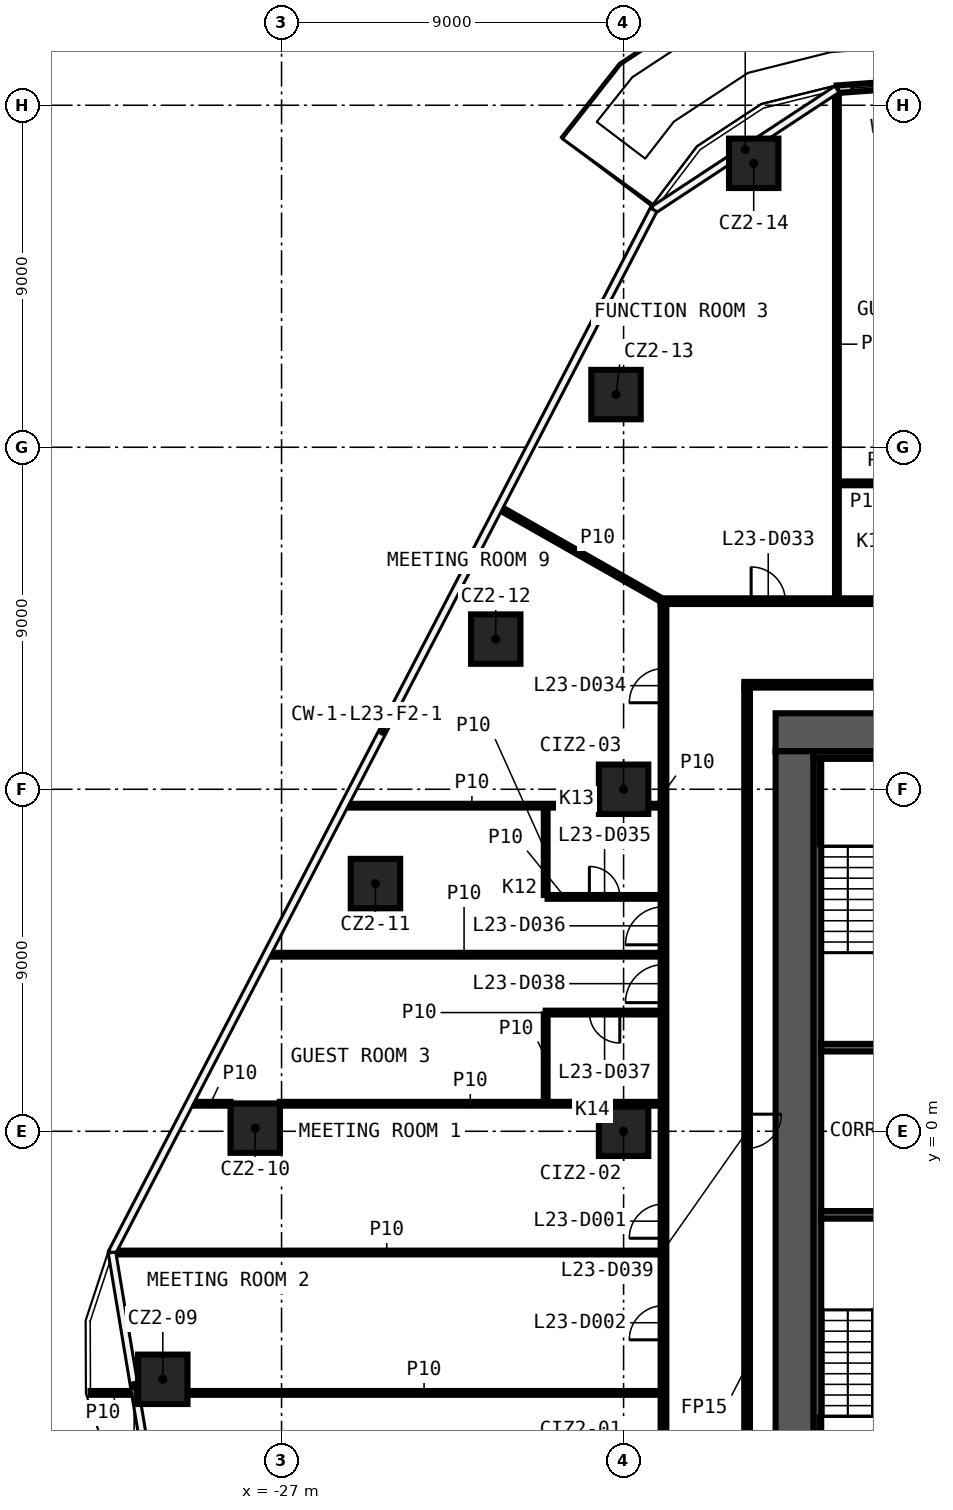
"""IFC4 building model, lengths in metres.
Left out: names, types, materials, properties, quantities, classifications, styles, units other than length and angle.
Written with IfcOpenShell. Run it as: python <this file> out.ifc"""

import sys

from ifc_helpers import new_model, si_unit, direction, frame, frame_2d, origin, origin_2d, place, context, subcontext, project, spatial, rectangle, extrude, element, fill, save


model = new_model("IFC4")
c1 = context("Model", 3, precision=1e-05, world=origin(), true_north=direction((0.0, 1.0)))
c2 = subcontext(c1, "Body", "Model", "MODEL_VIEW")
j1 = project(units=[si_unit("LENGTHUNIT", "METRE"), si_unit("PLANEANGLEUNIT", "RADIAN")], contexts=[c1])
p1 = place(None, origin())
s1 = spatial("IfcSite", under=j1, at=p1, CompositionType="ELEMENT")
p2 = place(p1, origin())
s2 = spatial("IfcBuilding", under=s1, at=p2, CompositionType="ELEMENT")
p3 = place(p2, frame((0.0, 0.0, 110.0)))
s3 = spatial("IfcBuildingStorey", under=s2, at=p3, CompositionType="ELEMENT", Elevation=110.0)
for number, where, z_axis, x_axis in (
    (1, (-30.125, -6.527, 0.0), (0.0, 0.0, 1.0), (1.0, 0.0, 0.0)),
    (2, (-27.693, 0.083, 0.0), (0.0, 0.0, 1.0), (1.0, 0.0, 0.0)),
    (3, (-24.529, 6.518, 0.0), (0.0, 0.0, 1.0), (1.0, 0.0, 0.0)),
    (4, (-21.364, 12.952, 0.0), (0.0, 0.0, 1.0), (1.0, 0.0, 0.0)),
    (5, (-18.199, 19.386, 0.0), (0.0, 0.0, 1.0), (1.0, 0.0, 0.0)),
    (6, (-14.576, 25.472, 0.0), (0.0, 0.0, 1.0), (1.0, 0.0, 0.0)),
    (7, (-18.0, 0.0, 0.0), (0.0, 0.0, 1.0), (1.0, 0.0, 0.0)),
    (8, (-18.0, 9.0, 0.0), (0.0, 0.0, 1.0), (1.0, 0.0, 0.0)),
):
    element("IfcColumn", number, at=place(p3, frame(where, z_axis=z_axis, x_axis=x_axis)), inside=s3, PredefinedType="COLUMN", context=c2, shape_type="SweptSolid", body=[
        extrude(rectangle(XDim=1.3, YDim=1.3, at=origin_2d()), origin(), (0.0, 0.0, 1.0), 3.3),
    ])
p4 = place(p3, frame((-32.027, -6.885, 0.0), z_axis=(0.0, 0.0, 1.0), x_axis=(1.0, 0.0, 0.0)))
e9 = element("IfcWall", 9, at=p4, inside=s3, PredefinedType="PARTITIONING", context=c2, shape_type="SweptSolid", body=[
    extrude(rectangle(XDim=1.252, YDim=0.1, at=frame_2d((0.626, 0.0))), origin(), (0.0, 0.0, 1.0), 3.3),
])
p5 = place(p3, frame((-29.475, -6.885, 0.0), z_axis=(0.0, 0.0, 1.0), x_axis=(1.0, 0.0, 0.0)))
e10 = element("IfcWall", 10, at=p5, inside=s3, PredefinedType="PARTITIONING", context=c2, shape_type="SweptSolid", body=[
    extrude(rectangle(XDim=12.45, YDim=0.1, at=frame_2d((6.225, 0.0))), origin(), (0.0, 0.0, 1.0), 3.3),
])
p6 = place(p3, frame((-31.439, -3.191, 0.0), z_axis=(0.0, 0.0, 1.0), x_axis=(1.0, 0.0, 0.0)))
e11 = element("IfcWall", 11, at=p6, inside=s3, PredefinedType="PARTITIONING", context=c2, shape_type="SweptSolid", body=[
    extrude(rectangle(XDim=14.414, YDim=0.1, at=frame_2d((7.207, 0.0))), origin(), (0.0, 0.0, 1.0), 3.3),
])
p7 = place(p3, frame((-29.406, 0.724, 0.0), z_axis=(0.0, 0.0, 1.0), x_axis=(1.0, 0.0, 0.0)))
e12 = element("IfcWall", 12, at=p7, inside=s3, PredefinedType="PARTITIONING", context=c2, shape_type="SweptSolid", body=[
    extrude(rectangle(XDim=1.063, YDim=0.1, at=frame_2d((0.531, 0.0))), origin(), (0.0, 0.0, 1.0), 3.3),
])
p8 = place(p3, frame((-27.043, 0.724, 0.0), z_axis=(0.0, 0.0, 1.0), x_axis=(1.0, 0.0, 0.0)))
e13 = element("IfcWall", 13, at=p8, inside=s3, PredefinedType="PARTITIONING", context=c2, shape_type="SweptSolid", body=[
    extrude(rectangle(XDim=10.018, YDim=0.1, at=frame_2d((5.009, 0.0))), origin(), (0.0, 0.0, 1.0), 3.3),
])
p9 = place(p3, frame((-17.025, 3.124, 0.0), z_axis=(0.0, 0.0, 1.0), x_axis=(-1.0, 0.0, 0.0)))
e14 = element("IfcWall", 14, at=p9, inside=s3, PredefinedType="PARTITIONING", context=c2, shape_type="SweptSolid", body=[
    extrude(rectangle(XDim=3.025, YDim=0.1, at=frame_2d((1.513, 0.0))), origin(), (0.0, 0.0, 1.0), 3.3),
])
p10 = place(p9, frame((1.075, 0.0, 0.0)))
e15 = element("IfcOpeningElement", 15, at=p10, cuts=e14, PredefinedType="OPENING", context=c2, shape_type="SweptSolid", body=[
    extrude(rectangle(XDim=0.8, YDim=2.1, at=frame_2d((0.4, 1.05))), frame((0.0, 0.06, 0.0), z_axis=(0.0, -1.0, 0.0), x_axis=(1.0, 0.0, 0.0)), (0.0, 0.0, 1.0), 0.12),
])
p11 = place(p3, frame((-27.369, 4.646, 0.0), z_axis=(0.0, 0.0, 1.0), x_axis=(1.0, 0.0, 0.0)))
e16 = element("IfcWall", 16, at=p11, inside=s3, PredefinedType="PARTITIONING", context=c2, shape_type="SweptSolid", body=[
    extrude(rectangle(XDim=10.344, YDim=0.1, at=frame_2d((5.172, 0.0))), origin(), (0.0, 0.0, 1.0), 3.3),
])
p12 = place(p3, frame((-20.0, 6.168, 0.0), z_axis=(0.0, 0.0, 1.0), x_axis=(1.0, 0.0, 0.0)))
e17 = element("IfcWall", 17, at=p12, inside=s3, PredefinedType="PARTITIONING", context=c2, shape_type="SweptSolid", body=[
    extrude(rectangle(XDim=2.975, YDim=0.1, at=frame_2d((1.488, 0.0))), origin(), (0.0, 0.0, 1.0), 3.3),
])
p13 = place(p12, frame((1.1, 0.0, 0.0)))
e18 = element("IfcOpeningElement", 18, at=p13, cuts=e17, PredefinedType="OPENING", context=c2, shape_type="SweptSolid", body=[
    extrude(rectangle(XDim=0.8, YDim=2.1, at=frame_2d((0.4, 1.05))), frame((0.0, 0.06, 0.0), z_axis=(0.0, -1.0, 0.0), x_axis=(1.0, 0.0, 0.0)), (0.0, 0.0, 1.0), 0.12),
])
p14 = place(p3, frame((-25.333, 8.568, 0.0), z_axis=(0.0, 0.0, 1.0), x_axis=(1.0, 0.0, 0.0)))
e19 = element("IfcWall", 19, at=p14, inside=s3, PredefinedType="PARTITIONING", context=c2, shape_type="SweptSolid", body=[
    extrude(rectangle(XDim=6.683, YDim=0.1, at=frame_2d((3.341, 0.0))), origin(), (0.0, 0.0, 1.0), 3.3),
])
p15 = place(p3, frame((-17.35, 8.568, 0.0), z_axis=(0.0, 0.0, 1.0), x_axis=(1.0, 0.0, 0.0)))
e20 = element("IfcWall", 20, at=p15, inside=s3, PredefinedType="PARTITIONING", context=c2, shape_type="SweptSolid", body=[
    extrude(rectangle(XDim=0.325, YDim=0.1, at=frame_2d((0.163, 0.0))), origin(), (0.0, 0.0, 1.0), 3.3),
])
p16 = place(p3, frame((-14.825, 11.75, 0.0), z_axis=(0.0, 0.0, 1.0), x_axis=(1.0, 0.0, 0.0)))
e21 = element("IfcWall", 21, at=p16, inside=s3, PredefinedType="PARTITIONING", context=c2, shape_type="SweptSolid", body=[
    extrude(rectangle(XDim=16.625, YDim=0.15, at=frame_2d((8.312, 0.0))), origin(), (0.0, 0.0, 1.0), 3.3),
])
p17 = place(p3, frame((-17.025, 13.95, 0.0), z_axis=(0.0, 0.0, 1.0), x_axis=(1.0, 0.0, 0.0)))
e22 = element("IfcWall", 22, at=p17, inside=s3, PredefinedType="PARTITIONING", context=c2, shape_type="SweptSolid", body=[
    extrude(rectangle(XDim=34.05, YDim=0.15, at=frame_2d((17.025, 0.0))), origin(), (0.0, 0.0, 1.0), 3.3),
])
p18 = place(p17, frame((29.735, 0.0, 0.0)))
e23 = element("IfcOpeningElement", 23, at=p18, cuts=e22, PredefinedType="OPENING", context=c2, shape_type="SweptSolid", body=[
    extrude(rectangle(XDim=1.0, YDim=2.1, at=frame_2d((0.5, 1.05))), frame((0.0, 0.085, 0.0), z_axis=(0.0, -1.0, 0.0), x_axis=(1.0, 0.0, 0.0)), (0.0, 0.0, 1.0), 0.17),
])
p19 = place(p17, frame((25.513, 0.0, 0.0)))
e24 = element("IfcOpeningElement", 24, at=p19, cuts=e22, PredefinedType="OPENING", context=c2, shape_type="SweptSolid", body=[
    extrude(rectangle(XDim=1.0, YDim=2.1, at=frame_2d((0.5, 1.05))), frame((0.0, 0.085, 0.0), z_axis=(0.0, -1.0, 0.0), x_axis=(1.0, 0.0, 0.0)), (0.0, 0.0, 1.0), 0.17),
])
p20 = place(p17, frame((18.631, 0.0, 0.0)))
e25 = element("IfcOpeningElement", 25, at=p20, cuts=e22, PredefinedType="OPENING", context=c2, shape_type="SweptSolid", body=[
    extrude(rectangle(XDim=1.0, YDim=2.1, at=frame_2d((0.5, 1.05))), frame((0.0, 0.085, 0.0), z_axis=(0.0, -1.0, 0.0), x_axis=(1.0, 0.0, 0.0)), (0.0, 0.0, 1.0), 0.17),
])
p21 = place(p17, frame((16.545, 0.0, 0.0)))
e26 = element("IfcOpeningElement", 26, at=p21, cuts=e22, PredefinedType="OPENING", context=c2, shape_type="SweptSolid", body=[
    extrude(rectangle(XDim=1.0, YDim=2.1, at=frame_2d((0.5, 1.05))), frame((0.0, 0.085, 0.0), z_axis=(0.0, -1.0, 0.0), x_axis=(1.0, 0.0, 0.0)), (0.0, 0.0, 1.0), 0.17),
])
p22 = place(p17, frame((9.659, 0.0, 0.0)))
e27 = element("IfcOpeningElement", 27, at=p22, cuts=e22, PredefinedType="OPENING", context=c2, shape_type="SweptSolid", body=[
    extrude(rectangle(XDim=1.0, YDim=2.1, at=frame_2d((0.5, 1.05))), frame((0.0, 0.085, 0.0), z_axis=(0.0, -1.0, 0.0), x_axis=(1.0, 0.0, 0.0)), (0.0, 0.0, 1.0), 0.17),
])
p23 = place(p17, frame((7.577, 0.0, 0.0)))
e28 = element("IfcOpeningElement", 28, at=p23, cuts=e22, PredefinedType="OPENING", context=c2, shape_type="SweptSolid", body=[
    extrude(rectangle(XDim=1.0, YDim=2.1, at=frame_2d((0.5, 1.05))), frame((0.0, 0.085, 0.0), z_axis=(0.0, -1.0, 0.0), x_axis=(1.0, 0.0, 0.0)), (0.0, 0.0, 1.0), 0.17),
])
p24 = place(p17, frame((2.381, 0.0, 0.0)))
e29 = element("IfcOpeningElement", 29, at=p24, cuts=e22, PredefinedType="OPENING", context=c2, shape_type="SweptSolid", body=[
    extrude(rectangle(XDim=0.9, YDim=2.1, at=frame_2d((0.45, 1.05))), frame((0.0, 0.085, 0.0), z_axis=(0.0, -1.0, 0.0), x_axis=(1.0, 0.0, 0.0)), (0.0, 0.0, 1.0), 0.17),
])
p25 = place(p3, frame((-12.337, 17.05, 0.0), z_axis=(0.0, 0.0, 1.0), x_axis=(1.0, 0.0, 0.0)))
e30 = element("IfcWall", 30, at=p25, inside=s3, PredefinedType="PARTITIONING", context=c2, shape_type="SweptSolid", body=[
    extrude(rectangle(XDim=2.4, YDim=0.1, at=frame_2d((1.2, 0.0))), origin(), (0.0, 0.0, 1.0), 3.3),
])
p26 = place(p3, frame((-12.387, 14.025, 0.0), z_axis=(0.0, 0.0, 1.0), x_axis=(0.0, 1.0, 0.0)))
e31 = element("IfcWall", 31, at=p26, inside=s3, PredefinedType="PARTITIONING", context=c2, shape_type="SweptSolid", body=[
    extrude(rectangle(XDim=13.376, YDim=0.1, at=frame_2d((6.688, 0.0))), origin(), (0.0, 0.0, 1.0), 3.3),
])
p27 = place(p3, frame((-14.75, 11.675, 0.0), z_axis=(0.0, 0.0, 1.0), x_axis=(0.0, -1.0, 0.0)))
e32 = element("IfcWall", 32, at=p27, inside=s3, PredefinedType="PARTITIONING", context=c2, shape_type="SweptSolid", body=[
    extrude(rectangle(XDim=23.35, YDim=0.15, at=frame_2d((11.675, 0.0))), origin(), (0.0, 0.0, 1.0), 3.3),
])
p28 = place(p27, frame((11.225, 0.0, 0.0)))
e33 = element("IfcOpeningElement", 33, at=p28, cuts=e32, PredefinedType="OPENING", context=c2, shape_type="SweptSolid", body=[
    extrude(rectangle(XDim=0.9, YDim=2.1, at=frame_2d((0.45, 1.05))), frame((0.0, 0.085, 0.0), z_axis=(0.0, -1.0, 0.0), x_axis=(1.0, 0.0, 0.0)), (0.0, 0.0, 1.0), 0.17),
])
p29 = place(p3, frame((-16.95, -13.875, 0.0), z_axis=(0.0, 0.0, 1.0), x_axis=(0.0, 1.0, 0.0)))
e34 = element("IfcWall", 34, at=p29, inside=s3, PredefinedType="PARTITIONING", context=c2, shape_type="SweptSolid", body=[
    extrude(rectangle(XDim=27.75, YDim=0.15, at=frame_2d((13.875, 0.0))), origin(), (0.0, 0.0, 1.0), 3.3),
])
p30 = place(p29, frame((11.06, 0.0, 0.0)))
e35 = element("IfcOpeningElement", 35, at=p30, cuts=e34, PredefinedType="OPENING", context=c2, shape_type="SweptSolid", body=[
    extrude(rectangle(XDim=0.9, YDim=2.1, at=frame_2d((0.45, 1.05))), frame((0.0, 0.085, 0.0), z_axis=(0.0, -1.0, 0.0), x_axis=(1.0, 0.0, 0.0)), (0.0, 0.0, 1.0), 0.17),
])
p31 = place(p29, frame((8.387, 0.0, 0.0)))
e36 = element("IfcOpeningElement", 36, at=p31, cuts=e34, PredefinedType="OPENING", context=c2, shape_type="SweptSolid", body=[
    extrude(rectangle(XDim=0.9, YDim=2.1, at=frame_2d((0.45, 1.05))), frame((0.0, 0.085, 0.0), z_axis=(0.0, -1.0, 0.0), x_axis=(1.0, 0.0, 0.0)), (0.0, 0.0, 1.0), 0.17),
])
p32 = place(p29, frame((1.666, 0.0, 0.0)))
e37 = element("IfcOpeningElement", 37, at=p32, cuts=e34, PredefinedType="OPENING", context=c2, shape_type="SweptSolid", body=[
    extrude(rectangle(XDim=0.9, YDim=2.1, at=frame_2d((0.45, 1.05))), frame((0.0, 0.085, 0.0), z_axis=(0.0, -1.0, 0.0), x_axis=(1.0, 0.0, 0.0)), (0.0, 0.0, 1.0), 0.17),
])
p33 = place(p29, frame((25.152, 0.0, 0.0)))
e38 = element("IfcOpeningElement", 38, at=p33, cuts=e34, PredefinedType="OPENING", context=c2, shape_type="SweptSolid", body=[
    extrude(rectangle(XDim=0.9, YDim=2.1, at=frame_2d((0.45, 1.05))), frame((0.0, 0.085, 0.0), z_axis=(0.0, -1.0, 0.0), x_axis=(1.0, 0.0, 0.0)), (0.0, 0.0, 1.0), 0.17),
])
p34 = place(p29, frame((18.782, 0.0, 0.0)))
e39 = element("IfcOpeningElement", 39, at=p34, cuts=e34, PredefinedType="OPENING", context=c2, shape_type="SweptSolid", body=[
    extrude(rectangle(XDim=1.0, YDim=2.1, at=frame_2d((0.5, 1.05))), frame((0.0, 0.085, 0.0), z_axis=(0.0, -1.0, 0.0), x_axis=(1.0, 0.0, 0.0)), (0.0, 0.0, 1.0), 0.17),
])
p35 = place(p29, frame((17.26, 0.0, 0.0)))
e40 = element("IfcOpeningElement", 40, at=p35, cuts=e34, PredefinedType="OPENING", context=c2, shape_type="SweptSolid", body=[
    extrude(rectangle(XDim=1.0, YDim=2.1, at=frame_2d((0.5, 1.05))), frame((0.0, 0.085, 0.0), z_axis=(0.0, -1.0, 0.0), x_axis=(1.0, 0.0, 0.0)), (0.0, 0.0, 1.0), 0.17),
])
p36 = place(p3, frame((-20.05, 0.774, 0.0), z_axis=(0.0, 0.0, 1.0), x_axis=(0.0, 1.0, 0.0)))
e41 = element("IfcWall", 41, at=p36, inside=s3, PredefinedType="PARTITIONING", context=c2, shape_type="SweptSolid", body=[
    extrude(rectangle(XDim=2.3, YDim=0.1, at=frame_2d((1.15, 0.0))), origin(), (0.0, 0.0, 1.0), 3.3),
])
p37 = place(p3, frame((-20.05, 6.218, 0.0), z_axis=(0.0, 0.0, 1.0), x_axis=(0.0, 1.0, 0.0)))
e42 = element("IfcWall", 42, at=p37, inside=s3, PredefinedType="PARTITIONING", context=c2, shape_type="SweptSolid", body=[
    extrude(rectangle(XDim=2.3, YDim=0.1, at=frame_2d((1.15, 0.0))), origin(), (0.0, 0.0, 1.0), 3.3),
])
p38 = place(p3, frame((-21.264, 16.401, 0.0), z_axis=(0.0, 0.0, 1.0), x_axis=(0.869409483432, -0.494092248592, 0.0)))
e43 = element("IfcWall", 43, at=p38, inside=s3, PredefinedType="PARTITIONING", context=c2, shape_type="SweptSolid", body=[
    extrude(rectangle(XDim=4.962, YDim=0.1, at=frame_2d((2.481, 0.0))), origin(), (0.0, 0.0, 1.0), 3.3),
])
p39 = place(p3, frame((-7.909, 27.743, 0.0), z_axis=(0.0, 0.0, 1.0), x_axis=(-0.997423796537, -0.071734023317, 0.0)))
e44 = element("IfcWall", 44, at=p39, inside=s3, PredefinedType="SOLIDWALL", context=c2, shape_type="SweptSolid", body=[
    extrude(rectangle(XDim=4.489, YDim=0.2, at=frame_2d((2.245, 0.0))), origin(), (0.0, 0.0, 1.0), 3.3),
])
p40 = place(p39, frame((2.5, 0.0, 0.6)))
e45 = element("IfcOpeningElement", 45, at=p40, cuts=e44, PredefinedType="OPENING", context=c2, shape_type="SweptSolid", body=[
    extrude(rectangle(XDim=1.6, YDim=2.4, at=frame_2d((0.8, 1.2))), frame((0.0, 0.11, 0.0), z_axis=(0.0, -1.0, 0.0), x_axis=(1.0, 0.0, 0.0)), (0.0, 0.0, 1.0), 0.22),
])
p41 = place(p39, frame((1.0, 0.0, 0.0)))
e46 = element("IfcOpeningElement", 46, at=p41, cuts=e44, PredefinedType="OPENING", context=c2, shape_type="SweptSolid", body=[
    extrude(rectangle(XDim=1.2, YDim=2.4, at=frame_2d((0.6, 1.2))), frame((0.0, 0.11, 0.0), z_axis=(0.0, -1.0, 0.0), x_axis=(1.0, 0.0, 0.0)), (0.0, 0.0, 1.0), 0.22),
])
p42 = place(p3, frame((-14.0, 10.5, 0.0), z_axis=(0.0, 0.0, 1.0), x_axis=(1.0, 0.0, 0.0)))
e47 = element("IfcWall", 47, at=p42, inside=s3, PredefinedType="SHEAR", context=c2, shape_type="SweptSolid", body=[
    extrude(rectangle(XDim=28.0, YDim=1.0, at=frame_2d((14.0, 0.0))), origin(), (0.0, 0.0, 1.0), 3.3),
])
p43 = place(p42, frame((15.9, 0.0, 0.0)))
e48 = element("IfcOpeningElement", 48, at=p43, cuts=e47, PredefinedType="OPENING", context=c2, shape_type="SweptSolid", body=[
    extrude(rectangle(XDim=1.6, YDim=2.1, at=frame_2d((0.8, 1.05))), frame((0.0, 0.51, 0.0), z_axis=(0.0, -1.0, 0.0), x_axis=(1.0, 0.0, 0.0)), (0.0, 0.0, 1.0), 1.02),
])
p44 = place(p3, frame((-13.5, -10.0, 0.0), z_axis=(0.0, 0.0, 1.0), x_axis=(0.0, 1.0, 0.0)))
e49 = element("IfcWall", 49, at=p44, inside=s3, PredefinedType="SHEAR", context=c2, shape_type="SweptSolid", body=[
    extrude(rectangle(XDim=20.0, YDim=1.0, at=frame_2d((10.0, 0.0))), origin(), (0.0, 0.0, 1.0), 3.3),
])
p45 = place(p3, frame((-13.0, 9.9, 0.0), z_axis=(0.0, 0.0, 1.0), x_axis=(1.0, 0.0, 0.0)))
e50 = element("IfcWall", 50, at=p45, inside=s3, PredefinedType="SHEAR", context=c2, shape_type="SweptSolid", body=[
    extrude(rectangle(XDim=14.5, YDim=0.2, at=frame_2d((7.25, 0.0))), origin(), (0.0, 0.0, 1.0), 3.3),
])
p46 = place(p3, frame((-12.9, -9.8, 0.0), z_axis=(0.0, 0.0, 1.0), x_axis=(0.0, 1.0, 0.0)))
e51 = element("IfcWall", 51, at=p46, inside=s3, PredefinedType="SHEAR", context=c2, shape_type="SweptSolid", body=[
    extrude(rectangle(XDim=19.6, YDim=0.2, at=frame_2d((9.8, 0.0))), origin(), (0.0, 0.0, 1.0), 3.3),
])
for number, where, z_axis, x_axis in (
    (52, (-9.45, 2.2, 0.0), (0.0, 0.0, 1.0), (-1.0, 0.0, 0.0)),
    (53, (-9.45, -2.2, 0.0), (0.0, 0.0, 1.0), (-1.0, 0.0, 0.0)),
):
    element("IfcWall", number, at=place(p3, frame(where, z_axis=z_axis, x_axis=x_axis)), inside=s3, PredefinedType="SHEAR", context=c2, shape_type="SweptSolid", body=[
        extrude(rectangle(XDim=3.35, YDim=0.2, at=frame_2d((1.675, 0.0))), origin(), (0.0, 0.0, 1.0), 3.3),
    ])
p47 = place(p30, origin())
e54 = element("IfcDoor", 54, at=p47, inside=s3, OperationType="SINGLE_SWING_RIGHT", PredefinedType="DOOR", context=c2, shape_type="SweptSolid", body=[
    extrude(rectangle(XDim=0.9, YDim=2.1, at=frame_2d((0.45, 1.05))), frame((0.0, 0.025, 0.0), z_axis=(0.0, -1.0, 0.0), x_axis=(1.0, 0.0, 0.0)), (0.0, 0.0, 1.0), 0.05),
])
fill(e35, e54)
p48 = place(p31, origin())
e55 = element("IfcDoor", 55, at=p48, inside=s3, OperationType="SINGLE_SWING_LEFT", PredefinedType="DOOR", context=c2, shape_type="SweptSolid", body=[
    extrude(rectangle(XDim=0.9, YDim=2.1, at=frame_2d((0.45, 1.05))), frame((0.0, 0.025, 0.0), z_axis=(0.0, -1.0, 0.0), x_axis=(1.0, 0.0, 0.0)), (0.0, 0.0, 1.0), 0.05),
])
fill(e36, e55)
p49 = place(p24, origin())
e56 = element("IfcDoor", 56, at=p49, inside=s3, OperationType="SINGLE_SWING_RIGHT", PredefinedType="DOOR", context=c2, shape_type="SweptSolid", body=[
    extrude(rectangle(XDim=0.9, YDim=2.1, at=frame_2d((0.45, 1.05))), frame((0.0, 0.025, 0.0), z_axis=(0.0, -1.0, 0.0), x_axis=(1.0, 0.0, 0.0)), (0.0, 0.0, 1.0), 0.05),
])
fill(e29, e56)
p50 = place(p33, origin())
e57 = element("IfcDoor", 57, at=p50, inside=s3, OperationType="SINGLE_SWING_LEFT", PredefinedType="DOOR", context=c2, shape_type="SweptSolid", body=[
    extrude(rectangle(XDim=0.9, YDim=2.1, at=frame_2d((0.45, 1.05))), frame((0.0, 0.025, 0.0), z_axis=(0.0, -1.0, 0.0), x_axis=(1.0, 0.0, 0.0)), (0.0, 0.0, 1.0), 0.05),
])
fill(e38, e57)
p51 = place(p13, origin())
e58 = element("IfcDoor", 58, at=p51, inside=s3, OperationType="SINGLE_SWING_LEFT", PredefinedType="DOOR", context=c2, shape_type="SweptSolid", body=[
    extrude(rectangle(XDim=0.8, YDim=2.1, at=frame_2d((0.4, 1.05))), frame((0.0, 0.025, 0.0), z_axis=(0.0, -1.0, 0.0), x_axis=(1.0, 0.0, 0.0)), (0.0, 0.0, 1.0), 0.05),
])
fill(e18, e58)
p52 = place(p34, origin())
e59 = element("IfcDoor", 59, at=p52, inside=s3, OperationType="SINGLE_SWING_RIGHT", PredefinedType="DOOR", context=c2, shape_type="SweptSolid", body=[
    extrude(rectangle(XDim=1.0, YDim=2.1, at=frame_2d((0.5, 1.05))), frame((0.0, 0.025, 0.0), z_axis=(0.0, -1.0, 0.0), x_axis=(1.0, 0.0, 0.0)), (0.0, 0.0, 1.0), 0.05),
])
fill(e39, e59)
p53 = place(p10, origin())
e60 = element("IfcDoor", 60, at=p53, inside=s3, OperationType="SINGLE_SWING_RIGHT", PredefinedType="DOOR", context=c2, shape_type="SweptSolid", body=[
    extrude(rectangle(XDim=0.8, YDim=2.1, at=frame_2d((0.4, 1.05))), frame((0.0, 0.025, 0.0), z_axis=(0.0, -1.0, 0.0), x_axis=(1.0, 0.0, 0.0)), (0.0, 0.0, 1.0), 0.05),
])
fill(e15, e60)
p54 = place(p35, origin())
e61 = element("IfcDoor", 61, at=p54, inside=s3, OperationType="SINGLE_SWING_LEFT", PredefinedType="DOOR", context=c2, shape_type="SweptSolid", body=[
    extrude(rectangle(XDim=1.0, YDim=2.1, at=frame_2d((0.5, 1.05))), frame((0.0, 0.025, 0.0), z_axis=(0.0, -1.0, 0.0), x_axis=(1.0, 0.0, 0.0)), (0.0, 0.0, 1.0), 0.05),
])
fill(e40, e61)
p55 = place(p28, origin())
e62 = element("IfcDoor", 62, at=p55, inside=s3, OperationType="SINGLE_SWING_RIGHT", PredefinedType="DOOR", context=c2, shape_type="SweptSolid", body=[
    extrude(rectangle(XDim=0.9, YDim=2.1, at=frame_2d((0.45, 1.05))), frame((0.0, 0.025, 0.0), z_axis=(0.0, -1.0, 0.0), x_axis=(1.0, 0.0, 0.0)), (0.0, 0.0, 1.0), 0.05),
])
fill(e33, e62)
p56 = place(p40, origin())
e63 = element("IfcWindow", 63, at=p56, inside=s3, PartitioningType="SINGLE_PANEL", PredefinedType="WINDOW", context=c2, shape_type="SweptSolid", body=[
    extrude(rectangle(XDim=1.6, YDim=2.4, at=frame_2d((0.8, 1.2))), frame((0.0, 0.03, 0.0), z_axis=(0.0, -1.0, 0.0), x_axis=(1.0, 0.0, 0.0)), (0.0, 0.0, 1.0), 0.06),
])
fill(e45, e63)
save(model, sys.argv[1])
